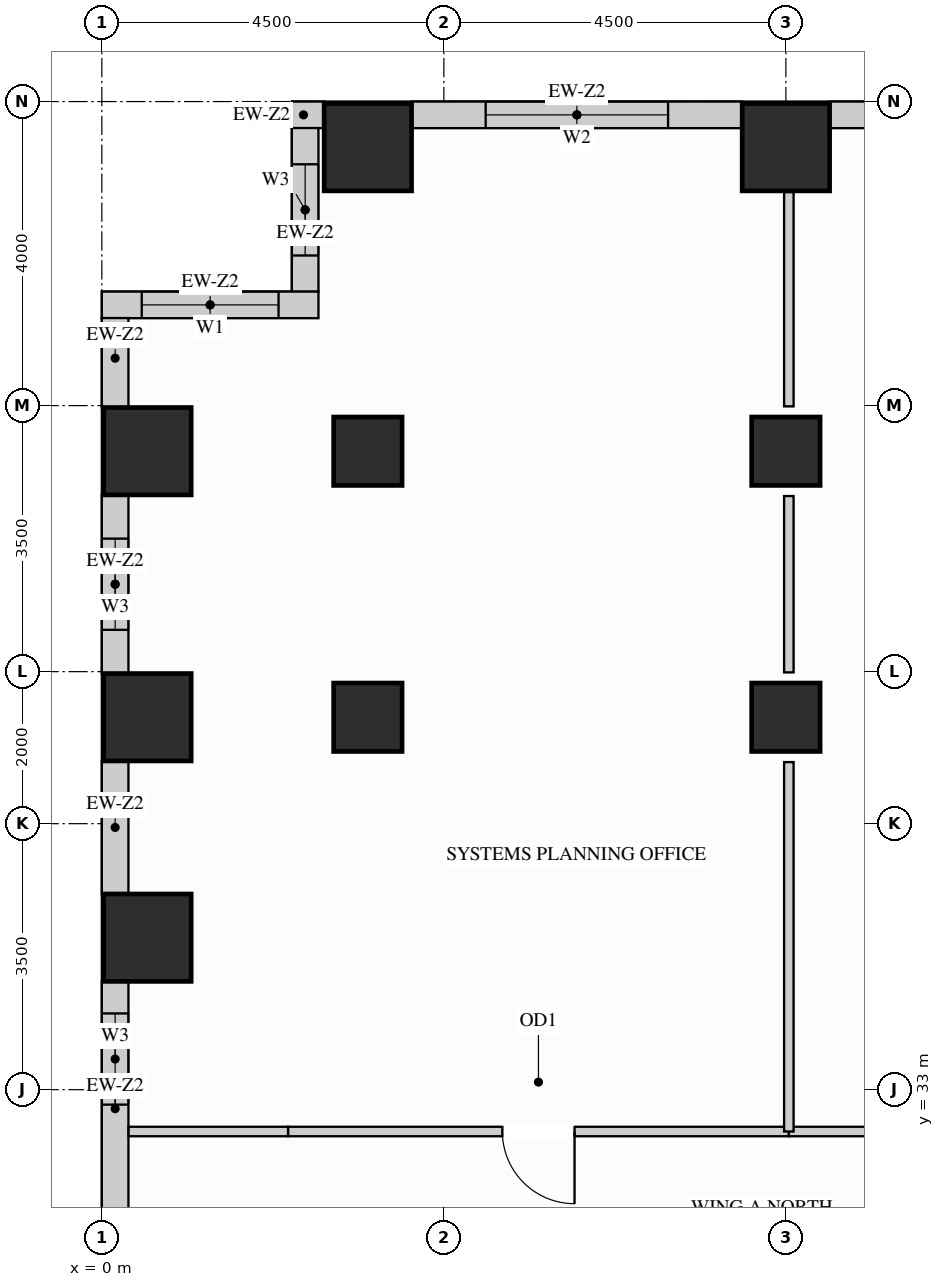
"""IFC4 building model, lengths in metres.
Left out: names, types, materials, properties, quantities, classifications, styles, units other than length and angle.
Written with IfcOpenShell. Run it as: python <this file> out.ifc"""

import sys

from ifc_helpers import new_model, si_unit, direction, frame, frame_2d, origin, origin_2d, place, context, subcontext, project, spatial, rectangle, extrude, source, transform, mapped, element, fill, save


model = new_model("IFC4")
c1 = context("Model", 3, precision=1e-05, world=origin(), true_north=direction((0.0, 1.0)))
c2 = subcontext(c1, "Body", "Model", "MODEL_VIEW")
j1 = project(units=[si_unit("LENGTHUNIT", "METRE"), si_unit("PLANEANGLEUNIT", "RADIAN")], contexts=[c1])
p1 = place(None, origin())
s1 = spatial("IfcSite", under=j1, at=p1, CompositionType="ELEMENT")
p2 = place(p1, origin())
s2 = spatial("IfcBuilding", under=s1, at=p2, CompositionType="ELEMENT")
p3 = place(p2, frame((0.0, 0.0, 81.0)))
s3 = spatial("IfcBuildingStorey", under=s2, at=p3, CompositionType="ELEMENT", Elevation=81.0)
m1 = source(origin(), c2, "Body", "SweptSolid", [
    extrude(rectangle(XDim=0.9, YDim=0.9, at=origin_2d()), origin(), (0.0, 0.0, 1.0), 3.38),
])
for number, where, z_axis, x_axis in (
    (1, (3.5, 37.9, 0.0), (0.0, 0.0, 1.0), (1.0, 0.0, 0.0)),
    (2, (3.5, 41.4, 0.0), (0.0, 0.0, 1.0), (1.0, 0.0, 0.0)),
    (3, (9.0, 37.9, 0.0), (0.0, 0.0, 1.0), (1.0, 0.0, 0.0)),
    (4, (9.0, 41.4, 0.0), (0.0, 0.0, 1.0), (1.0, 0.0, 0.0)),
):
    element("IfcColumn", number, at=place(p3, frame(where, z_axis=z_axis, x_axis=x_axis)), inside=s3, PredefinedType="COLUMN", context=c2, shape_type="MappedRepresentation", body=[
        mapped(m1, transform((0.0, 0.0, 0.0), x_axis=(1.0, 0.0, 0.0), y_axis=(0.0, 1.0, 0.0), z_axis=(0.0, 0.0, 1.0))),
    ])
m2 = source(origin(), c2, "Body", "SweptSolid", [
    extrude(rectangle(XDim=1.15, YDim=1.15, at=origin_2d()), origin(), (0.0, 0.0, 1.0), 3.38),
])
for number, where, z_axis, x_axis in (
    (5, (3.5, 45.4, 0.0), (0.0, 0.0, 1.0), (1.0, 0.0, 0.0)),
    (6, (9.0, 45.4, 0.0), (0.0, 0.0, 1.0), (1.0, 0.0, 0.0)),
    (7, (0.6, 35.0, 0.0), (0.0, 0.0, 1.0), (1.0, 0.0, 0.0)),
    (8, (0.6, 37.9, 0.0), (0.0, 0.0, 1.0), (1.0, 0.0, 0.0)),
    (9, (0.6, 41.4, 0.0), (0.0, 0.0, 1.0), (1.0, 0.0, 0.0)),
):
    element("IfcColumn", number, at=place(p3, frame(where, z_axis=z_axis, x_axis=x_axis)), inside=s3, PredefinedType="COLUMN", context=c2, shape_type="MappedRepresentation", body=[
        mapped(m2, transform((0.0, 0.0, 0.0), x_axis=(1.0, 0.0, 0.0), y_axis=(0.0, 1.0, 0.0), z_axis=(0.0, 0.0, 1.0))),
    ])
p4 = place(p3, frame((13.927, 45.825, 0.0), z_axis=(0.0, 0.0, 1.0), x_axis=(-1.0, 0.0, 0.0)))
e10 = element("IfcWall", 10, at=p4, inside=s3, PredefinedType="SOLIDWALL", context=c2, shape_type="SweptSolid", body=[
    extrude(rectangle(XDim=4.354, YDim=0.35, at=frame_2d((2.177, 0.0))), origin(), (0.0, 0.0, 1.0), 3.365),
])
p5 = place(p4, frame((0.977, 0.0, 0.78)))
e11 = element("IfcOpeningElement", 11, at=p5, cuts=e10, PredefinedType="OPENING", context=c2, shape_type="SweptSolid", body=[
    extrude(rectangle(XDim=2.4, YDim=2.1, at=frame_2d((1.2, 1.05))), frame((0.0, 0.185, 0.0), z_axis=(0.0, -1.0, 0.0), x_axis=(1.0, 0.0, 0.0)), (0.0, 0.0, 1.0), 0.37),
])
p6 = place(p3, frame((8.427, 45.825, 0.0), z_axis=(0.0, 0.0, 1.0), x_axis=(-1.0, 0.0, 0.0)))
e12 = element("IfcWall", 12, at=p6, inside=s3, PredefinedType="SOLIDWALL", context=c2, shape_type="SweptSolid", body=[
    extrude(rectangle(XDim=4.354, YDim=0.35, at=frame_2d((2.177, 0.0))), origin(), (0.0, 0.0, 1.0), 3.365),
])
p7 = place(p6, frame((0.977, 0.0, 0.78)))
e13 = element("IfcOpeningElement", 13, at=p7, cuts=e12, PredefinedType="OPENING", context=c2, shape_type="SweptSolid", body=[
    extrude(rectangle(XDim=2.4, YDim=2.1, at=frame_2d((1.2, 1.05))), frame((0.0, 0.185, 0.0), z_axis=(0.0, -1.0, 0.0), x_axis=(1.0, 0.0, 0.0)), (0.0, 0.0, 1.0), 0.37),
])
m3 = source(origin(), c2, "Body", "SweptSolid", [
    extrude(rectangle(XDim=0.427, YDim=0.35, at=frame_2d((0.213, 0.0))), origin(), (0.0, 0.0, 1.0), 3.365),
])
p8 = place(p3, frame((2.927, 45.825, 0.0), z_axis=(0.0, 0.0, 1.0), x_axis=(-1.0, 0.0, 0.0)))
e14 = element("IfcWall", 14, at=p8, inside=s3, PredefinedType="SOLIDWALL", context=c2, shape_type="MappedRepresentation", body=[
    mapped(m3, transform((0.0, 0.0, 0.0), x_axis=(1.0, 0.0, 0.0), y_axis=(0.0, 1.0, 0.0), z_axis=(0.0, 0.0, 1.0))),
])
p9 = place(p3, frame((2.675, 45.652, 0.0), z_axis=(0.0, 0.0, 1.0), x_axis=(0.0, -1.0, 0.0)))
e15 = element("IfcWall", 15, at=p9, inside=s3, PredefinedType="SOLIDWALL", context=c2, shape_type="SweptSolid", body=[
    extrude(rectangle(XDim=2.154, YDim=0.35, at=frame_2d((1.077, 0.0))), origin(), (0.0, 0.0, 1.0), 3.365),
])
p10 = place(p9, frame((0.477, 0.0, 0.78)))
e16 = element("IfcOpeningElement", 16, at=p10, cuts=e15, PredefinedType="OPENING", context=c2, shape_type="SweptSolid", body=[
    extrude(rectangle(XDim=1.2, YDim=2.1, at=frame_2d((0.6, 1.05))), frame((0.0, 0.185, 0.0), z_axis=(0.0, -1.0, 0.0), x_axis=(1.0, 0.0, 0.0)), (0.0, 0.0, 1.0), 0.37),
])
p11 = place(p3, frame((2.85, 43.325, 0.0), z_axis=(0.0, 0.0, 1.0), x_axis=(-1.0, 0.0, 0.0)))
e17 = element("IfcWall", 17, at=p11, inside=s3, PredefinedType="SOLIDWALL", context=c2, shape_type="SweptSolid", body=[
    extrude(rectangle(XDim=2.85, YDim=0.35, at=frame_2d((1.425, 0.0))), origin(), (0.0, 0.0, 1.0), 3.365),
])
p12 = place(p11, frame((0.525, 0.0, 0.78)))
e18 = element("IfcOpeningElement", 18, at=p12, cuts=e17, PredefinedType="OPENING", context=c2, shape_type="SweptSolid", body=[
    extrude(rectangle(XDim=1.8, YDim=2.1, at=frame_2d((0.9, 1.05))), frame((0.0, 0.185, 0.0), z_axis=(0.0, -1.0, 0.0), x_axis=(1.0, 0.0, 0.0)), (0.0, 0.0, 1.0), 0.37),
])
m4 = source(origin(), c2, "Body", "SweptSolid", [
    extrude(rectangle(XDim=1.179, YDim=0.35, at=frame_2d((0.59, 0.0))), origin(), (0.0, 0.0, 1.0), 3.365),
])
p13 = place(p3, frame((0.175, 43.152, 0.0), z_axis=(0.0, 0.0, 1.0), x_axis=(0.0, -1.0, 0.0)))
e19 = element("IfcWall", 19, at=p13, inside=s3, PredefinedType="SOLIDWALL", context=c2, shape_type="MappedRepresentation", body=[
    mapped(m4, transform((0.0, 0.0, 0.0), x_axis=(1.0, 0.0, 0.0), y_axis=(0.0, 1.0, 0.0), z_axis=(0.0, 0.0, 1.0))),
])
p14 = place(p3, frame((0.175, 40.827, 0.0), z_axis=(0.0, 0.0, 1.0), x_axis=(0.0, -1.0, 0.0)))
e20 = element("IfcWall", 20, at=p14, inside=s3, PredefinedType="SOLIDWALL", context=c2, shape_type="SweptSolid", body=[
    extrude(rectangle(XDim=2.354, YDim=0.35, at=frame_2d((1.177, 0.0))), origin(), (0.0, 0.0, 1.0), 3.365),
])
p15 = place(p14, frame((0.577, 0.0, 0.78)))
e21 = element("IfcOpeningElement", 21, at=p15, cuts=e20, PredefinedType="OPENING", context=c2, shape_type="SweptSolid", body=[
    extrude(rectangle(XDim=1.2, YDim=2.1, at=frame_2d((0.6, 1.05))), frame((0.0, 0.185, 0.0), z_axis=(0.0, -1.0, 0.0), x_axis=(1.0, 0.0, 0.0)), (0.0, 0.0, 1.0), 0.37),
])
m5 = source(origin(), c2, "Body", "SweptSolid", [
    extrude(rectangle(XDim=1.754, YDim=0.35, at=frame_2d((0.877, 0.0))), origin(), (0.0, 0.0, 1.0), 3.365),
])
p16 = place(p3, frame((0.175, 37.327, 0.0), z_axis=(0.0, 0.0, 1.0), x_axis=(0.0, -1.0, 0.0)))
e22 = element("IfcWall", 22, at=p16, inside=s3, PredefinedType="SOLIDWALL", context=c2, shape_type="MappedRepresentation", body=[
    mapped(m5, transform((0.0, 0.0, 0.0), x_axis=(1.0, 0.0, 0.0), y_axis=(0.0, 1.0, 0.0), z_axis=(0.0, 0.0, 1.0))),
])
p17 = place(p3, frame((0.175, 34.427, 0.0), z_axis=(0.0, 0.0, 1.0), x_axis=(0.0, -1.0, 0.0)))
e23 = element("IfcWall", 23, at=p17, inside=s3, PredefinedType="SOLIDWALL", context=c2, shape_type="SweptSolid", body=[
    extrude(rectangle(XDim=3.354, YDim=0.35, at=frame_2d((1.677, 0.0))), origin(), (0.0, 0.0, 1.0), 3.365),
])
p18 = place(p17, frame((0.424, 0.0, 0.78)))
e24 = element("IfcOpeningElement", 24, at=p18, cuts=e23, PredefinedType="OPENING", context=c2, shape_type="SweptSolid", body=[
    extrude(rectangle(XDim=1.2, YDim=2.1, at=frame_2d((0.6, 1.05))), frame((0.0, 0.185, 0.0), z_axis=(0.0, -1.0, 0.0), x_axis=(1.0, 0.0, 0.0)), (0.0, 0.0, 1.0), 0.37),
])
p19 = place(p3, frame((2.45, 32.45, 0.0), z_axis=(0.0, 0.0, 1.0), x_axis=(1.0, 0.0, 0.0)))
e25 = element("IfcWall", 25, at=p19, inside=s3, PredefinedType="PARTITIONING", context=c2, shape_type="SweptSolid", body=[
    extrude(rectangle(XDim=6.589, YDim=0.125, at=frame_2d((3.294, 0.0))), origin(), (0.0, 0.0, 1.0), 3.365),
])
p20 = place(p19, frame((2.82, 0.0, 0.0)))
e26 = element("IfcOpeningElement", 26, at=p20, cuts=e25, PredefinedType="OPENING", context=c2, shape_type="SweptSolid", body=[
    extrude(rectangle(XDim=0.95, YDim=2.15, at=frame_2d((0.475, 1.075))), frame((0.0, 0.073, 0.0), z_axis=(0.0, -1.0, 0.0), x_axis=(1.0, 0.0, 0.0)), (0.0, 0.0, 1.0), 0.145),
])
p21 = place(p3, frame((9.039, 32.45, 0.0), z_axis=(0.0, 0.0, 1.0), x_axis=(1.0, 0.0, 0.0)))
e27 = element("IfcWall", 27, at=p21, inside=s3, PredefinedType="PARTITIONING", context=c2, shape_type="SweptSolid", body=[
    extrude(rectangle(XDim=8.011, YDim=0.125, at=frame_2d((4.005, 0.0))), origin(), (0.0, 0.0, 1.0), 3.365),
])
p22 = place(p21, frame((3.531, 0.0, 0.0)))
e28 = element("IfcOpeningElement", 28, at=p22, cuts=e27, PredefinedType="OPENING", context=c2, shape_type="SweptSolid", body=[
    extrude(rectangle(XDim=0.95, YDim=2.15, at=frame_2d((0.475, 1.075))), frame((0.0, 0.073, 0.0), z_axis=(0.0, -1.0, 0.0), x_axis=(1.0, 0.0, 0.0)), (0.0, 0.0, 1.0), 0.145),
])
m6 = source(origin(), c2, "Body", "SweptSolid", [
    extrude(rectangle(XDim=2.098, YDim=0.125, at=frame_2d((1.049, 0.0))), origin(), (0.0, 0.0, 1.0), 3.365),
])
p23 = place(p3, frame((0.352, 32.45, 0.0), z_axis=(0.0, 0.0, 1.0), x_axis=(1.0, 0.0, 0.0)))
e29 = element("IfcWall", 29, at=p23, inside=s3, PredefinedType="PARTITIONING", context=c2, shape_type="MappedRepresentation", body=[
    mapped(m6, transform((0.0, 0.0, 0.0), x_axis=(1.0, 0.0, 0.0), y_axis=(0.0, 1.0, 0.0), z_axis=(0.0, 0.0, 1.0))),
])
m7 = source(origin(), c2, "Body", "SweptSolid", [
    extrude(rectangle(XDim=4.86, YDim=0.125, at=frame_2d((2.43, 0.0))), origin(), (0.0, 0.0, 1.0), 3.365),
])
p24 = place(p3, frame((9.039, 32.45, 0.0), z_axis=(0.0, 0.0, 1.0), x_axis=(0.0, 1.0, 0.0)))
e30 = element("IfcWall", 30, at=p24, inside=s3, PredefinedType="PARTITIONING", context=c2, shape_type="MappedRepresentation", body=[
    mapped(m7, transform((0.0, 0.0, 0.0), x_axis=(1.0, 0.0, 0.0), y_axis=(0.0, 1.0, 0.0), z_axis=(0.0, 0.0, 1.0))),
])
m8 = source(origin(), c2, "Body", "SweptSolid", [
    extrude(rectangle(XDim=2.32, YDim=0.125, at=frame_2d((1.16, 0.0))), origin(), (0.0, 0.0, 1.0), 2.677),
])
p25 = place(p3, frame((9.039, 38.49, 0.0), z_axis=(0.0, 0.0, 1.0), x_axis=(0.0, 1.0, 0.0)))
e31 = element("IfcWall", 31, at=p25, inside=s3, PredefinedType="PARTITIONING", context=c2, shape_type="MappedRepresentation", body=[
    mapped(m8, transform((0.0, 0.0, 0.0), x_axis=(1.0, 0.0, 0.0), y_axis=(0.0, 1.0, 0.0), z_axis=(0.0, 0.0, 1.0))),
])
m9 = source(origin(), c2, "Body", "SweptSolid", [
    extrude(rectangle(XDim=2.82, YDim=0.125, at=frame_2d((1.41, 0.0))), origin(), (0.0, 0.0, 1.0), 2.677),
])
p26 = place(p3, frame((9.039, 41.99, 0.0), z_axis=(0.0, 0.0, 1.0), x_axis=(0.0, 1.0, 0.0)))
e32 = element("IfcWall", 32, at=p26, inside=s3, PredefinedType="PARTITIONING", context=c2, shape_type="MappedRepresentation", body=[
    mapped(m9, transform((0.0, 0.0, 0.0), x_axis=(1.0, 0.0, 0.0), y_axis=(0.0, 1.0, 0.0), z_axis=(0.0, 0.0, 1.0))),
])
m10 = source(origin(), c2, "Body", "SweptSolid", [
    extrude(rectangle(XDim=0.95, YDim=2.15, at=frame_2d((0.475, 1.075))), frame((0.0, 0.025, 0.0), z_axis=(0.0, -1.0, 0.0), x_axis=(1.0, 0.0, 0.0)), (0.0, 0.0, 1.0), 0.05),
])
p27 = place(p20, origin())
e33 = element("IfcDoor", 33, at=p27, inside=s3, OperationType="SINGLE_SWING_RIGHT", PredefinedType="DOOR", context=c2, shape_type="MappedRepresentation", body=[
    mapped(m10, transform((0.0, 0.0, 0.0), x_axis=(1.0, 0.0, 0.0), y_axis=(0.0, 1.0, 0.0), z_axis=(0.0, 0.0, 1.0))),
])
fill(e26, e33)
m11 = source(origin(), c2, "Body", "SweptSolid", [
    extrude(rectangle(XDim=1.8, YDim=2.1, at=frame_2d((0.9, 1.05))), frame((0.0, 0.03, 0.0), z_axis=(0.0, -1.0, 0.0), x_axis=(1.0, 0.0, 0.0)), (0.0, 0.0, 1.0), 0.06),
])
p28 = place(p12, origin())
e34 = element("IfcWindow", 34, at=p28, inside=s3, PartitioningType="SINGLE_PANEL", PredefinedType="WINDOW", context=c2, shape_type="MappedRepresentation", body=[
    mapped(m11, transform((0.0, 0.0, 0.0), x_axis=(1.0, 0.0, 0.0), y_axis=(0.0, 1.0, 0.0), z_axis=(0.0, 0.0, 1.0))),
])
fill(e18, e34)
m12 = source(origin(), c2, "Body", "SweptSolid", [
    extrude(rectangle(XDim=2.4, YDim=2.1, at=frame_2d((1.2, 1.05))), frame((0.0, 0.03, 0.0), z_axis=(0.0, -1.0, 0.0), x_axis=(1.0, 0.0, 0.0)), (0.0, 0.0, 1.0), 0.06),
])
p29 = place(p7, origin())
e35 = element("IfcWindow", 35, at=p29, inside=s3, PartitioningType="SINGLE_PANEL", PredefinedType="WINDOW", context=c2, shape_type="MappedRepresentation", body=[
    mapped(m12, transform((0.0, 0.0, 0.0), x_axis=(1.0, 0.0, 0.0), y_axis=(0.0, 1.0, 0.0), z_axis=(0.0, 0.0, 1.0))),
])
fill(e13, e35)
m13 = source(origin(), c2, "Body", "SweptSolid", [
    extrude(rectangle(XDim=1.2, YDim=2.1, at=frame_2d((0.6, 1.05))), frame((0.0, 0.03, 0.0), z_axis=(0.0, -1.0, 0.0), x_axis=(1.0, 0.0, 0.0)), (0.0, 0.0, 1.0), 0.06),
])
p30 = place(p10, origin())
e36 = element("IfcWindow", 36, at=p30, inside=s3, PartitioningType="SINGLE_PANEL", PredefinedType="WINDOW", context=c2, shape_type="MappedRepresentation", body=[
    mapped(m13, transform((0.0, 0.0, 0.0), x_axis=(1.0, 0.0, 0.0), y_axis=(0.0, 1.0, 0.0), z_axis=(0.0, 0.0, 1.0))),
])
fill(e16, e36)
p31 = place(p15, origin())
e37 = element("IfcWindow", 37, at=p31, inside=s3, PartitioningType="SINGLE_PANEL", PredefinedType="WINDOW", context=c2, shape_type="MappedRepresentation", body=[
    mapped(m13, transform((0.0, 0.0, 0.0), x_axis=(1.0, 0.0, 0.0), y_axis=(0.0, 1.0, 0.0), z_axis=(0.0, 0.0, 1.0))),
])
fill(e21, e37)
p32 = place(p18, origin())
e38 = element("IfcWindow", 38, at=p32, inside=s3, PartitioningType="SINGLE_PANEL", PredefinedType="WINDOW", context=c2, shape_type="MappedRepresentation", body=[
    mapped(m13, transform((0.0, 0.0, 0.0), x_axis=(1.0, 0.0, 0.0), y_axis=(0.0, 1.0, 0.0), z_axis=(0.0, 0.0, 1.0))),
])
fill(e24, e38)
save(model, sys.argv[1])
